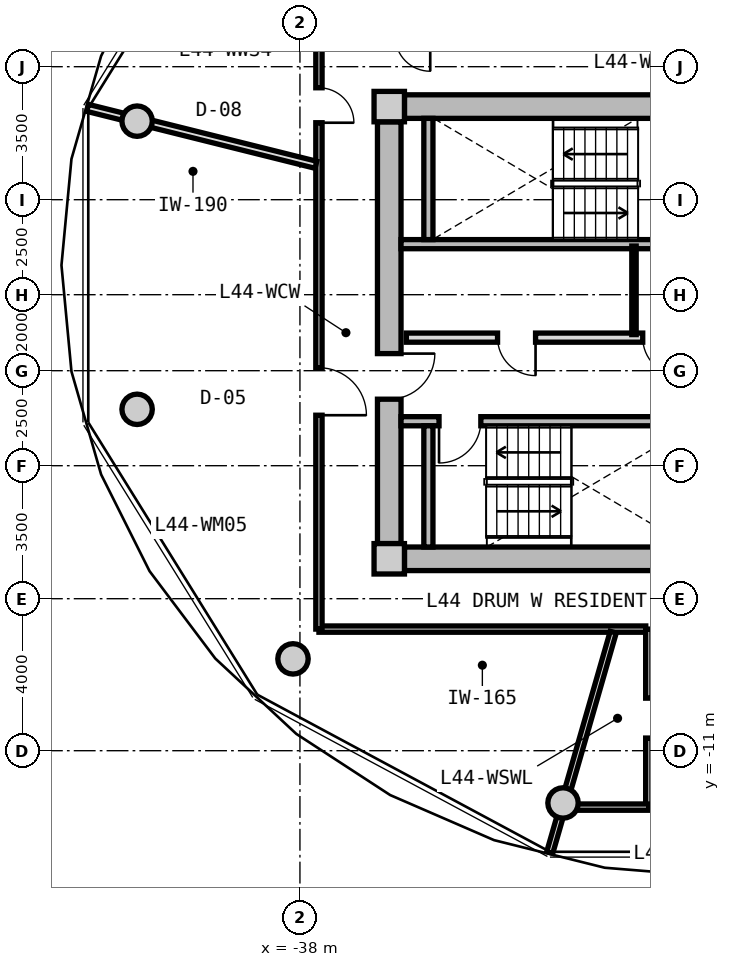
"""IFC4 building model, lengths in metres.
Left out: names, types, materials, properties, quantities, classifications, styles, units other than length and angle.
Written with IfcOpenShell. Run it as: python <this file> out.ifc"""

import sys

from ifc_helpers import new_model, si_unit, direction, frame, frame_2d, origin, origin_2d, place, context, subcontext, project, spatial, rectangle, circle, extrude, source, transform, mapped, element, fill, save


model = new_model("IFC4")
c1 = context("Model", 3, precision=1e-05, world=origin(), true_north=direction((0.0, 1.0)))
c2 = subcontext(c1, "Body", "Model", "MODEL_VIEW")
j1 = project(units=[si_unit("LENGTHUNIT", "METRE"), si_unit("PLANEANGLEUNIT", "RADIAN")], contexts=[c1])
p1 = place(None, origin())
s1 = spatial("IfcSite", under=j1, at=p1, CompositionType="ELEMENT")
p2 = place(p1, origin())
s2 = spatial("IfcBuilding", under=s1, at=p2, CompositionType="ELEMENT")
p3 = place(p2, frame((0.0, 0.0, 143.45)))
s3 = spatial("IfcBuildingStorey", under=s2, at=p3, CompositionType="ELEMENT", Elevation=143.45)
m1 = source(origin(), c2, "Body", "SweptSolid", [
    extrude(rectangle(XDim=0.8, YDim=0.8, at=origin_2d()), origin(), (0.0, 0.0, 1.0), 3.05),
])
for number, where, z_axis, x_axis in (
    (1, (-35.65, -5.95, 0.0), (0.0, 0.0, 1.0), (1.0, 0.0, 0.0)),
    (2, (-35.65, 5.95, 0.0), (0.0, 0.0, 1.0), (1.0, 0.0, 0.0)),
):
    element("IfcColumn", number, at=place(p3, frame(where, z_axis=z_axis, x_axis=x_axis)), inside=s3, PredefinedType="COLUMN", context=c2, shape_type="MappedRepresentation", body=[
        mapped(m1, transform((0.0, 0.0, 0.0), x_axis=(1.0, 0.0, 0.0), y_axis=(0.0, 1.0, 0.0), z_axis=(0.0, 0.0, 1.0), scale=1.0)),
    ])
m2 = source(origin(), c2, "Body", "SweptSolid", [
    extrude(rectangle(XDim=14.5, YDim=0.62, at=frame_2d((7.25, 0.0))), origin(), (0.0, 0.0, 1.0), 2.81),
])
for number, where, z_axis, x_axis in (
    (3, (-35.25, 5.95, 0.0), (0.0, 0.0, 1.0), (1.0, 0.0, 0.0)),
    (4, (-20.75, -5.95, 0.0), (0.0, 0.0, 1.0), (-1.0, 0.0, 0.0)),
):
    element("IfcWall", number, at=place(p3, frame(where, z_axis=z_axis, x_axis=x_axis)), inside=s3, PredefinedType="SHEAR", context=c2, shape_type="MappedRepresentation", body=[
        mapped(m2, transform((0.0, 0.0, 0.0), x_axis=(1.0, 0.0, 0.0), y_axis=(0.0, 1.0, 0.0), z_axis=(0.0, 0.0, 1.0), scale=1.0)),
    ])
m3 = source(origin(), c2, "Body", "SweptSolid", [
    extrude(rectangle(XDim=11.1, YDim=0.62, at=frame_2d((5.55, 0.0))), origin(), (0.0, 0.0, 1.0), 2.81),
])
p4 = place(p3, frame((-35.65, -5.55, 0.0), z_axis=(0.0, 0.0, 1.0), x_axis=(0.0, 1.0, 0.0)))
e5 = element("IfcWall", 5, at=p4, inside=s3, PredefinedType="SHEAR", context=c2, shape_type="MappedRepresentation", body=[
    mapped(m3, transform((0.0, 0.0, 0.0), x_axis=(1.0, 0.0, 0.0), y_axis=(0.0, 1.0, 0.0), z_axis=(0.0, 0.0, 1.0), scale=1.0)),
])
p5 = place(p4, frame((3.8, 0.0, 0.0)))
e6 = element("IfcOpeningElement", 6, at=p5, cuts=e5, PredefinedType="OPENING", context=c2, shape_type="SweptSolid", body=[
    extrude(rectangle(XDim=1.2, YDim=2.15, at=frame_2d((0.6, 1.075))), frame((0.0, 0.32, 0.0), z_axis=(0.0, -1.0, 0.0), x_axis=(1.0, 0.0, 0.0)), (0.0, 0.0, 1.0), 0.64),
])
m4 = source(origin(), c2, "Body", "SweptSolid", [
    extrude(circle(Radius=0.4, at=origin_2d()), origin(), (0.0, 0.0, 1.0), 3.05),
])
for number, where, z_axis, x_axis in (
    (7, (-42.285, 5.567, 0.0), (0.0, 0.0, 1.0), (1.0, 0.0, 0.0)),
    (8, (-42.285, -2.016, 0.0), (0.0, 0.0, 1.0), (1.0, 0.0, 0.0)),
    (9, (-38.183, -8.584, 0.0), (0.0, 0.0, 1.0), (1.0, 0.0, 0.0)),
    (10, (-31.077, -12.375, 0.0), (0.0, 0.0, 1.0), (1.0, 0.0, 0.0)),
):
    element("IfcColumn", number, at=place(p3, frame(where, z_axis=z_axis, x_axis=x_axis)), inside=s3, PredefinedType="COLUMN", context=c2, shape_type="MappedRepresentation", body=[
        mapped(m4, transform((0.0, 0.0, 0.0), x_axis=(1.0, 0.0, 0.0), y_axis=(0.0, 1.0, 0.0), z_axis=(0.0, 0.0, 1.0), scale=1.0)),
    ])
m5 = source(origin(), c2, "Body", "SweptSolid", [
    extrude(rectangle(XDim=7.88, YDim=0.24, at=frame_2d((3.94, 0.0))), origin(), (0.0, 0.0, 1.0), 2.81),
])
p6 = place(p3, frame((-35.34, 2.33, 0.0), z_axis=(0.0, 0.0, 1.0), x_axis=(1.0, 0.0, 0.0)))
e11 = element("IfcWall", 11, at=p6, inside=s3, PredefinedType="PARTITIONING", context=c2, shape_type="MappedRepresentation", body=[
    mapped(m5, transform((0.0, 0.0, 0.0), x_axis=(1.0, 0.0, 0.0), y_axis=(0.0, 1.0, 0.0), z_axis=(0.0, 0.0, 1.0), scale=1.0)),
])
m6 = source(origin(), c2, "Body", "SweptSolid", [
    extrude(rectangle(XDim=3.19, YDim=0.24, at=frame_2d((1.595, 0.0))), origin(), (0.0, 0.0, 1.0), 2.81),
])
p7 = place(p3, frame((-34.62, 2.45, 0.0), z_axis=(0.0, 0.0, 1.0), x_axis=(0.0, 1.0, 0.0)))
e12 = element("IfcWall", 12, at=p7, inside=s3, PredefinedType="PARTITIONING", context=c2, shape_type="MappedRepresentation", body=[
    mapped(m6, transform((0.0, 0.0, 0.0), x_axis=(1.0, 0.0, 0.0), y_axis=(0.0, 1.0, 0.0), z_axis=(0.0, 0.0, 1.0), scale=1.0)),
])
p8 = place(p3, frame((-35.34, -2.33, 0.0), z_axis=(0.0, 0.0, 1.0), x_axis=(1.0, 0.0, 0.0)))
e13 = element("IfcWall", 13, at=p8, inside=s3, PredefinedType="PARTITIONING", context=c2, shape_type="MappedRepresentation", body=[
    mapped(m5, transform((0.0, 0.0, 0.0), x_axis=(1.0, 0.0, 0.0), y_axis=(0.0, 1.0, 0.0), z_axis=(0.0, 0.0, 1.0), scale=1.0)),
])
p9 = place(p8, frame((1.0, 0.0, 0.0)))
e14 = element("IfcOpeningElement", 14, at=p9, cuts=e13, PredefinedType="OPENING", context=c2, shape_type="SweptSolid", body=[
    extrude(rectangle(XDim=1.1, YDim=2.15, at=frame_2d((0.55, 1.075))), frame((0.0, 0.13, 0.0), z_axis=(0.0, -1.0, 0.0), x_axis=(1.0, 0.0, 0.0)), (0.0, 0.0, 1.0), 0.26),
])
p10 = place(p3, frame((-34.62, -5.64, 0.0), z_axis=(0.0, 0.0, 1.0), x_axis=(0.0, 1.0, 0.0)))
e15 = element("IfcWall", 15, at=p10, inside=s3, PredefinedType="PARTITIONING", context=c2, shape_type="MappedRepresentation", body=[
    mapped(m6, transform((0.0, 0.0, 0.0), x_axis=(1.0, 0.0, 0.0), y_axis=(0.0, 1.0, 0.0), z_axis=(0.0, 0.0, 1.0), scale=1.0)),
])
m7 = source(origin(), c2, "Body", "SweptSolid", [
    extrude(rectangle(XDim=7.62, YDim=0.24, at=frame_2d((3.81, 0.0))), origin(), (0.0, 0.0, 1.0), 2.795),
])
p11 = place(p3, frame((-35.2, -0.13, 0.0), z_axis=(0.0, 0.0, 1.0), x_axis=(1.0, 0.0, 0.0)))
e16 = element("IfcWall", 16, at=p11, inside=s3, PredefinedType="PARTITIONING", context=c2, shape_type="MappedRepresentation", body=[
    mapped(m7, transform((0.0, 0.0, 0.0), x_axis=(1.0, 0.0, 0.0), y_axis=(0.0, 1.0, 0.0), z_axis=(0.0, 0.0, 1.0), scale=1.0)),
])
p12 = place(p11, frame((6.22, 0.0, 0.0)))
e17 = element("IfcOpeningElement", 17, at=p12, cuts=e16, PredefinedType="OPENING", context=c2, shape_type="SweptSolid", body=[
    extrude(rectangle(XDim=1.0, YDim=2.1, at=frame_2d((0.5, 1.05))), frame((0.0, 0.13, 0.0), z_axis=(0.0, -1.0, 0.0), x_axis=(1.0, 0.0, 0.0)), (0.0, 0.0, 1.0), 0.26),
])
p13 = place(p11, frame((2.4, 0.0, 0.0)))
e18 = element("IfcOpeningElement", 18, at=p13, cuts=e16, PredefinedType="OPENING", context=c2, shape_type="SweptSolid", body=[
    extrude(rectangle(XDim=1.0, YDim=2.1, at=frame_2d((0.5, 1.05))), frame((0.0, 0.13, 0.0), z_axis=(0.0, -1.0, 0.0), x_axis=(1.0, 0.0, 0.0)), (0.0, 0.0, 1.0), 0.26),
])
m8 = source(origin(), c2, "Body", "SweptSolid", [
    extrude(rectangle(XDim=2.33, YDim=0.115, at=frame_2d((1.165, 0.0))), origin(), (0.0, 0.0, 1.0), 2.795),
])
p14 = place(p3, frame((-29.21, -0.05, 0.0), z_axis=(0.0, 0.0, 1.0), x_axis=(0.0, 1.0, 0.0)))
e19 = element("IfcWall", 19, at=p14, inside=s3, PredefinedType="PARTITIONING", context=c2, shape_type="MappedRepresentation", body=[
    mapped(m8, transform((0.0, 0.0, 0.0), x_axis=(1.0, 0.0, 0.0), y_axis=(0.0, 1.0, 0.0), z_axis=(0.0, 0.0, 1.0), scale=1.0)),
])
m9 = source(origin(), c2, "Body", "SweptSolid", [
    extrude(rectangle(XDim=8.6, YDim=0.165, at=frame_2d((4.3, 0.0))), origin(), (0.0, 0.0, 1.0), 2.795),
])
p15 = place(p3, frame((-28.9, -7.8, 0.0), z_axis=(0.0, 0.0, 1.0), x_axis=(-1.0, 0.0, 0.0)))
e20 = element("IfcWall", 20, at=p15, inside=s3, PredefinedType="PARTITIONING", context=c2, shape_type="MappedRepresentation", body=[
    mapped(m9, transform((0.0, 0.0, 0.0), x_axis=(1.0, 0.0, 0.0), y_axis=(0.0, 1.0, 0.0), z_axis=(0.0, 0.0, 1.0), scale=1.0)),
])
m10 = source(origin(), c2, "Body", "SweptSolid", [
    extrude(rectangle(XDim=15.6, YDim=0.165, at=frame_2d((7.8, 0.0))), origin(), (0.0, 0.0, 1.0), 2.795),
])
p16 = place(p3, frame((-37.5, -7.8, 0.0), z_axis=(0.0, 0.0, 1.0), x_axis=(0.0, 1.0, 0.0)))
e21 = element("IfcWall", 21, at=p16, inside=s3, PredefinedType="PARTITIONING", context=c2, shape_type="MappedRepresentation", body=[
    mapped(m10, transform((0.0, 0.0, 0.0), x_axis=(1.0, 0.0, 0.0), y_axis=(0.0, 1.0, 0.0), z_axis=(0.0, 0.0, 1.0), scale=1.0)),
])
p17 = place(p16, frame((13.325, 0.0, 0.0)))
e22 = element("IfcOpeningElement", 22, at=p17, cuts=e21, PredefinedType="OPENING", context=c2, shape_type="SweptSolid", body=[
    extrude(rectangle(XDim=0.92, YDim=2.1, at=frame_2d((0.46, 1.05))), frame((0.0, 0.093, 0.0), z_axis=(0.0, -1.0, 0.0), x_axis=(1.0, 0.0, 0.0)), (0.0, 0.0, 1.0), 0.185),
])
p18 = place(p16, frame((5.628, 0.0, 0.0)))
e23 = element("IfcOpeningElement", 23, at=p18, cuts=e21, PredefinedType="OPENING", context=c2, shape_type="SweptSolid", body=[
    extrude(rectangle(XDim=1.25, YDim=2.2, at=frame_2d((0.625, 1.1))), frame((0.0, 0.093, 0.0), z_axis=(0.0, -1.0, 0.0), x_axis=(1.0, 0.0, 0.0)), (0.0, 0.0, 1.0), 0.185),
])
m11 = source(origin(), c2, "Body", "SweptSolid", [
    extrude(rectangle(XDim=6.035, YDim=0.165, at=frame_2d((3.018, 0.0))), origin(), (0.0, 0.0, 1.0), 2.345),
])
p19 = place(p3, frame((-29.756, -7.88, 0.0), z_axis=(0.0, 0.0, 1.0), x_axis=(-0.276809454862, -0.960924828329, 0.0)))
e24 = element("IfcWall", 24, at=p19, inside=s3, PredefinedType="PARTITIONING", context=c2, shape_type="MappedRepresentation", body=[
    mapped(m11, transform((0.0, 0.0, 0.0), x_axis=(1.0, 0.0, 0.0), y_axis=(0.0, 1.0, 0.0), z_axis=(0.0, 0.0, 1.0), scale=1.0)),
])
m12 = source(origin(), c2, "Body", "SweptSolid", [
    extrude(rectangle(XDim=4.685, YDim=0.165, at=frame_2d((2.342, 0.0))), origin(), (0.0, 0.0, 1.0), 2.795),
])
p20 = place(p3, frame((-28.82, -12.485, 0.0), z_axis=(0.0, 0.0, 1.0), x_axis=(0.0, 1.0, 0.0)))
e25 = element("IfcWall", 25, at=p20, inside=s3, PredefinedType="PARTITIONING", context=c2, shape_type="MappedRepresentation", body=[
    mapped(m12, transform((0.0, 0.0, 0.0), x_axis=(1.0, 0.0, 0.0), y_axis=(0.0, 1.0, 0.0), z_axis=(0.0, 0.0, 1.0), scale=1.0)),
])
p21 = place(p20, frame((1.817, 0.0, 0.0)))
e26 = element("IfcOpeningElement", 26, at=p21, cuts=e25, PredefinedType="OPENING", context=c2, shape_type="SweptSolid", body=[
    extrude(rectangle(XDim=1.05, YDim=2.15, at=frame_2d((0.525, 1.075))), frame((0.0, 0.093, 0.0), z_axis=(0.0, -1.0, 0.0), x_axis=(1.0, 0.0, 0.0)), (0.0, 0.0, 1.0), 0.185),
])
m13 = source(origin(), c2, "Body", "SweptSolid", [
    extrude(rectangle(XDim=2.419, YDim=0.165, at=frame_2d((1.209, 0.0))), origin(), (0.0, 0.0, 1.0), 2.345),
])
p22 = place(p3, frame((-31.239, -12.485, 0.0), z_axis=(0.0, 0.0, 1.0), x_axis=(1.0, 0.0, 0.0)))
e27 = element("IfcWall", 27, at=p22, inside=s3, PredefinedType="PARTITIONING", context=c2, shape_type="MappedRepresentation", body=[
    mapped(m13, transform((0.0, 0.0, 0.0), x_axis=(1.0, 0.0, 0.0), y_axis=(0.0, 1.0, 0.0), z_axis=(0.0, 0.0, 1.0), scale=1.0)),
])
m14 = source(origin(), c2, "Body", "SweptSolid", [
    extrude(rectangle(XDim=6.193, YDim=0.19, at=frame_2d((3.096, 0.0))), origin(), (0.0, 0.0, 1.0), 2.345),
])
p23 = place(p3, frame((-37.58, 4.419, 0.0), z_axis=(0.0, 0.0, 1.0), x_axis=(-0.970309243466, 0.241867674657, 0.0)))
e28 = element("IfcWall", 28, at=p23, inside=s3, PredefinedType="PARTITIONING", context=c2, shape_type="MappedRepresentation", body=[
    mapped(m14, transform((0.0, 0.0, 0.0), x_axis=(1.0, 0.0, 0.0), y_axis=(0.0, 1.0, 0.0), z_axis=(0.0, 0.0, 1.0), scale=1.0)),
])
m15 = source(origin(), c2, "Body", "SweptSolid", [
    extrude(rectangle(XDim=1.1, YDim=2.15, at=frame_2d((0.55, 1.075))), frame((0.0, 0.025, 0.0), z_axis=(0.0, -1.0, 0.0), x_axis=(1.0, 0.0, 0.0)), (0.0, 0.0, 1.0), 0.05),
])
p24 = place(p9, frame((1.1, 0.0, 0.0), z_axis=(0.0, 0.0, 1.0), x_axis=(-1.0, 0.0, 0.0)))
e29 = element("IfcDoor", 29, at=p24, inside=s3, OperationType="SINGLE_SWING_RIGHT", PredefinedType="DOOR", context=c2, shape_type="MappedRepresentation", body=[
    mapped(m15, transform((0.0, 0.0, 0.0), x_axis=(1.0, 0.0, 0.0), y_axis=(0.0, 1.0, 0.0), z_axis=(0.0, 0.0, 1.0), scale=1.0)),
])
fill(e14, e29)
m16 = source(origin(), c2, "Body", "SweptSolid", [
    extrude(rectangle(XDim=1.2, YDim=2.15, at=frame_2d((0.6, 1.075))), frame((0.0, 0.025, 0.0), z_axis=(0.0, -1.0, 0.0), x_axis=(1.0, 0.0, 0.0)), (0.0, 0.0, 1.0), 0.05),
])
p25 = place(p5, frame((1.2, 0.0, 0.0), z_axis=(0.0, 0.0, 1.0), x_axis=(-1.0, 0.0, 0.0)))
e30 = element("IfcDoor", 30, at=p25, inside=s3, OperationType="SINGLE_SWING_LEFT", PredefinedType="DOOR", context=c2, shape_type="MappedRepresentation", body=[
    mapped(m16, transform((0.0, 0.0, 0.0), x_axis=(1.0, 0.0, 0.0), y_axis=(0.0, 1.0, 0.0), z_axis=(0.0, 0.0, 1.0), scale=1.0)),
])
fill(e6, e30)
m17 = source(origin(), c2, "Body", "SweptSolid", [
    extrude(rectangle(XDim=1.0, YDim=2.1, at=frame_2d((0.5, 1.05))), frame((0.0, 0.025, 0.0), z_axis=(0.0, -1.0, 0.0), x_axis=(1.0, 0.0, 0.0)), (0.0, 0.0, 1.0), 0.05),
])
p26 = place(p12, frame((1.0, 0.0, 0.0), z_axis=(0.0, 0.0, 1.0), x_axis=(-1.0, 0.0, 0.0)))
e31 = element("IfcDoor", 31, at=p26, inside=s3, OperationType="SINGLE_SWING_LEFT", PredefinedType="DOOR", context=c2, shape_type="MappedRepresentation", body=[
    mapped(m17, transform((0.0, 0.0, 0.0), x_axis=(1.0, 0.0, 0.0), y_axis=(0.0, 1.0, 0.0), z_axis=(0.0, 0.0, 1.0), scale=1.0)),
])
fill(e17, e31)
p27 = place(p13, frame((1.0, 0.0, 0.0), z_axis=(0.0, 0.0, 1.0), x_axis=(-1.0, 0.0, 0.0)))
e32 = element("IfcDoor", 32, at=p27, inside=s3, OperationType="SINGLE_SWING_LEFT", PredefinedType="DOOR", context=c2, shape_type="MappedRepresentation", body=[
    mapped(m17, transform((0.0, 0.0, 0.0), x_axis=(1.0, 0.0, 0.0), y_axis=(0.0, 1.0, 0.0), z_axis=(0.0, 0.0, 1.0), scale=1.0)),
])
fill(e18, e32)
m18 = source(origin(), c2, "Body", "SweptSolid", [
    extrude(rectangle(XDim=1.05, YDim=2.15, at=frame_2d((0.525, 1.075))), frame((0.0, 0.025, 0.0), z_axis=(0.0, -1.0, 0.0), x_axis=(1.0, 0.0, 0.0)), (0.0, 0.0, 1.0), 0.05),
])
p28 = place(p21, frame((1.05, 0.0, 0.0), z_axis=(0.0, 0.0, 1.0), x_axis=(-1.0, 0.0, 0.0)))
e33 = element("IfcDoor", 33, at=p28, inside=s3, OperationType="SINGLE_SWING_RIGHT", PredefinedType="DOOR", context=c2, shape_type="MappedRepresentation", body=[
    mapped(m18, transform((0.0, 0.0, 0.0), x_axis=(1.0, 0.0, 0.0), y_axis=(0.0, 1.0, 0.0), z_axis=(0.0, 0.0, 1.0), scale=1.0)),
])
fill(e26, e33)
m19 = source(origin(), c2, "Body", "SweptSolid", [
    extrude(rectangle(XDim=0.92, YDim=2.1, at=frame_2d((0.46, 1.05))), frame((0.0, 0.025, 0.0), z_axis=(0.0, -1.0, 0.0), x_axis=(1.0, 0.0, 0.0)), (0.0, 0.0, 1.0), 0.05),
])
p29 = place(p17, frame((0.92, 0.0, 0.0), z_axis=(0.0, 0.0, 1.0), x_axis=(-1.0, 0.0, 0.0)))
e34 = element("IfcDoor", 34, at=p29, inside=s3, OperationType="SINGLE_SWING_RIGHT", PredefinedType="DOOR", context=c2, shape_type="MappedRepresentation", body=[
    mapped(m19, transform((0.0, 0.0, 0.0), x_axis=(1.0, 0.0, 0.0), y_axis=(0.0, 1.0, 0.0), z_axis=(0.0, 0.0, 1.0), scale=1.0)),
])
fill(e22, e34)
m20 = source(origin(), c2, "Body", "SweptSolid", [
    extrude(rectangle(XDim=1.25, YDim=2.2, at=frame_2d((0.625, 1.1))), frame((0.0, 0.025, 0.0), z_axis=(0.0, -1.0, 0.0), x_axis=(1.0, 0.0, 0.0)), (0.0, 0.0, 1.0), 0.05),
])
p30 = place(p18, frame((1.25, 0.0, 0.0), z_axis=(0.0, 0.0, 1.0), x_axis=(-1.0, 0.0, 0.0)))
e35 = element("IfcDoor", 35, at=p30, inside=s3, OperationType="SINGLE_SWING_RIGHT", PredefinedType="DOOR", context=c2, shape_type="MappedRepresentation", body=[
    mapped(m20, transform((0.0, 0.0, 0.0), x_axis=(1.0, 0.0, 0.0), y_axis=(0.0, 1.0, 0.0), z_axis=(0.0, 0.0, 1.0), scale=1.0)),
])
fill(e23, e35)
save(model, sys.argv[1])
